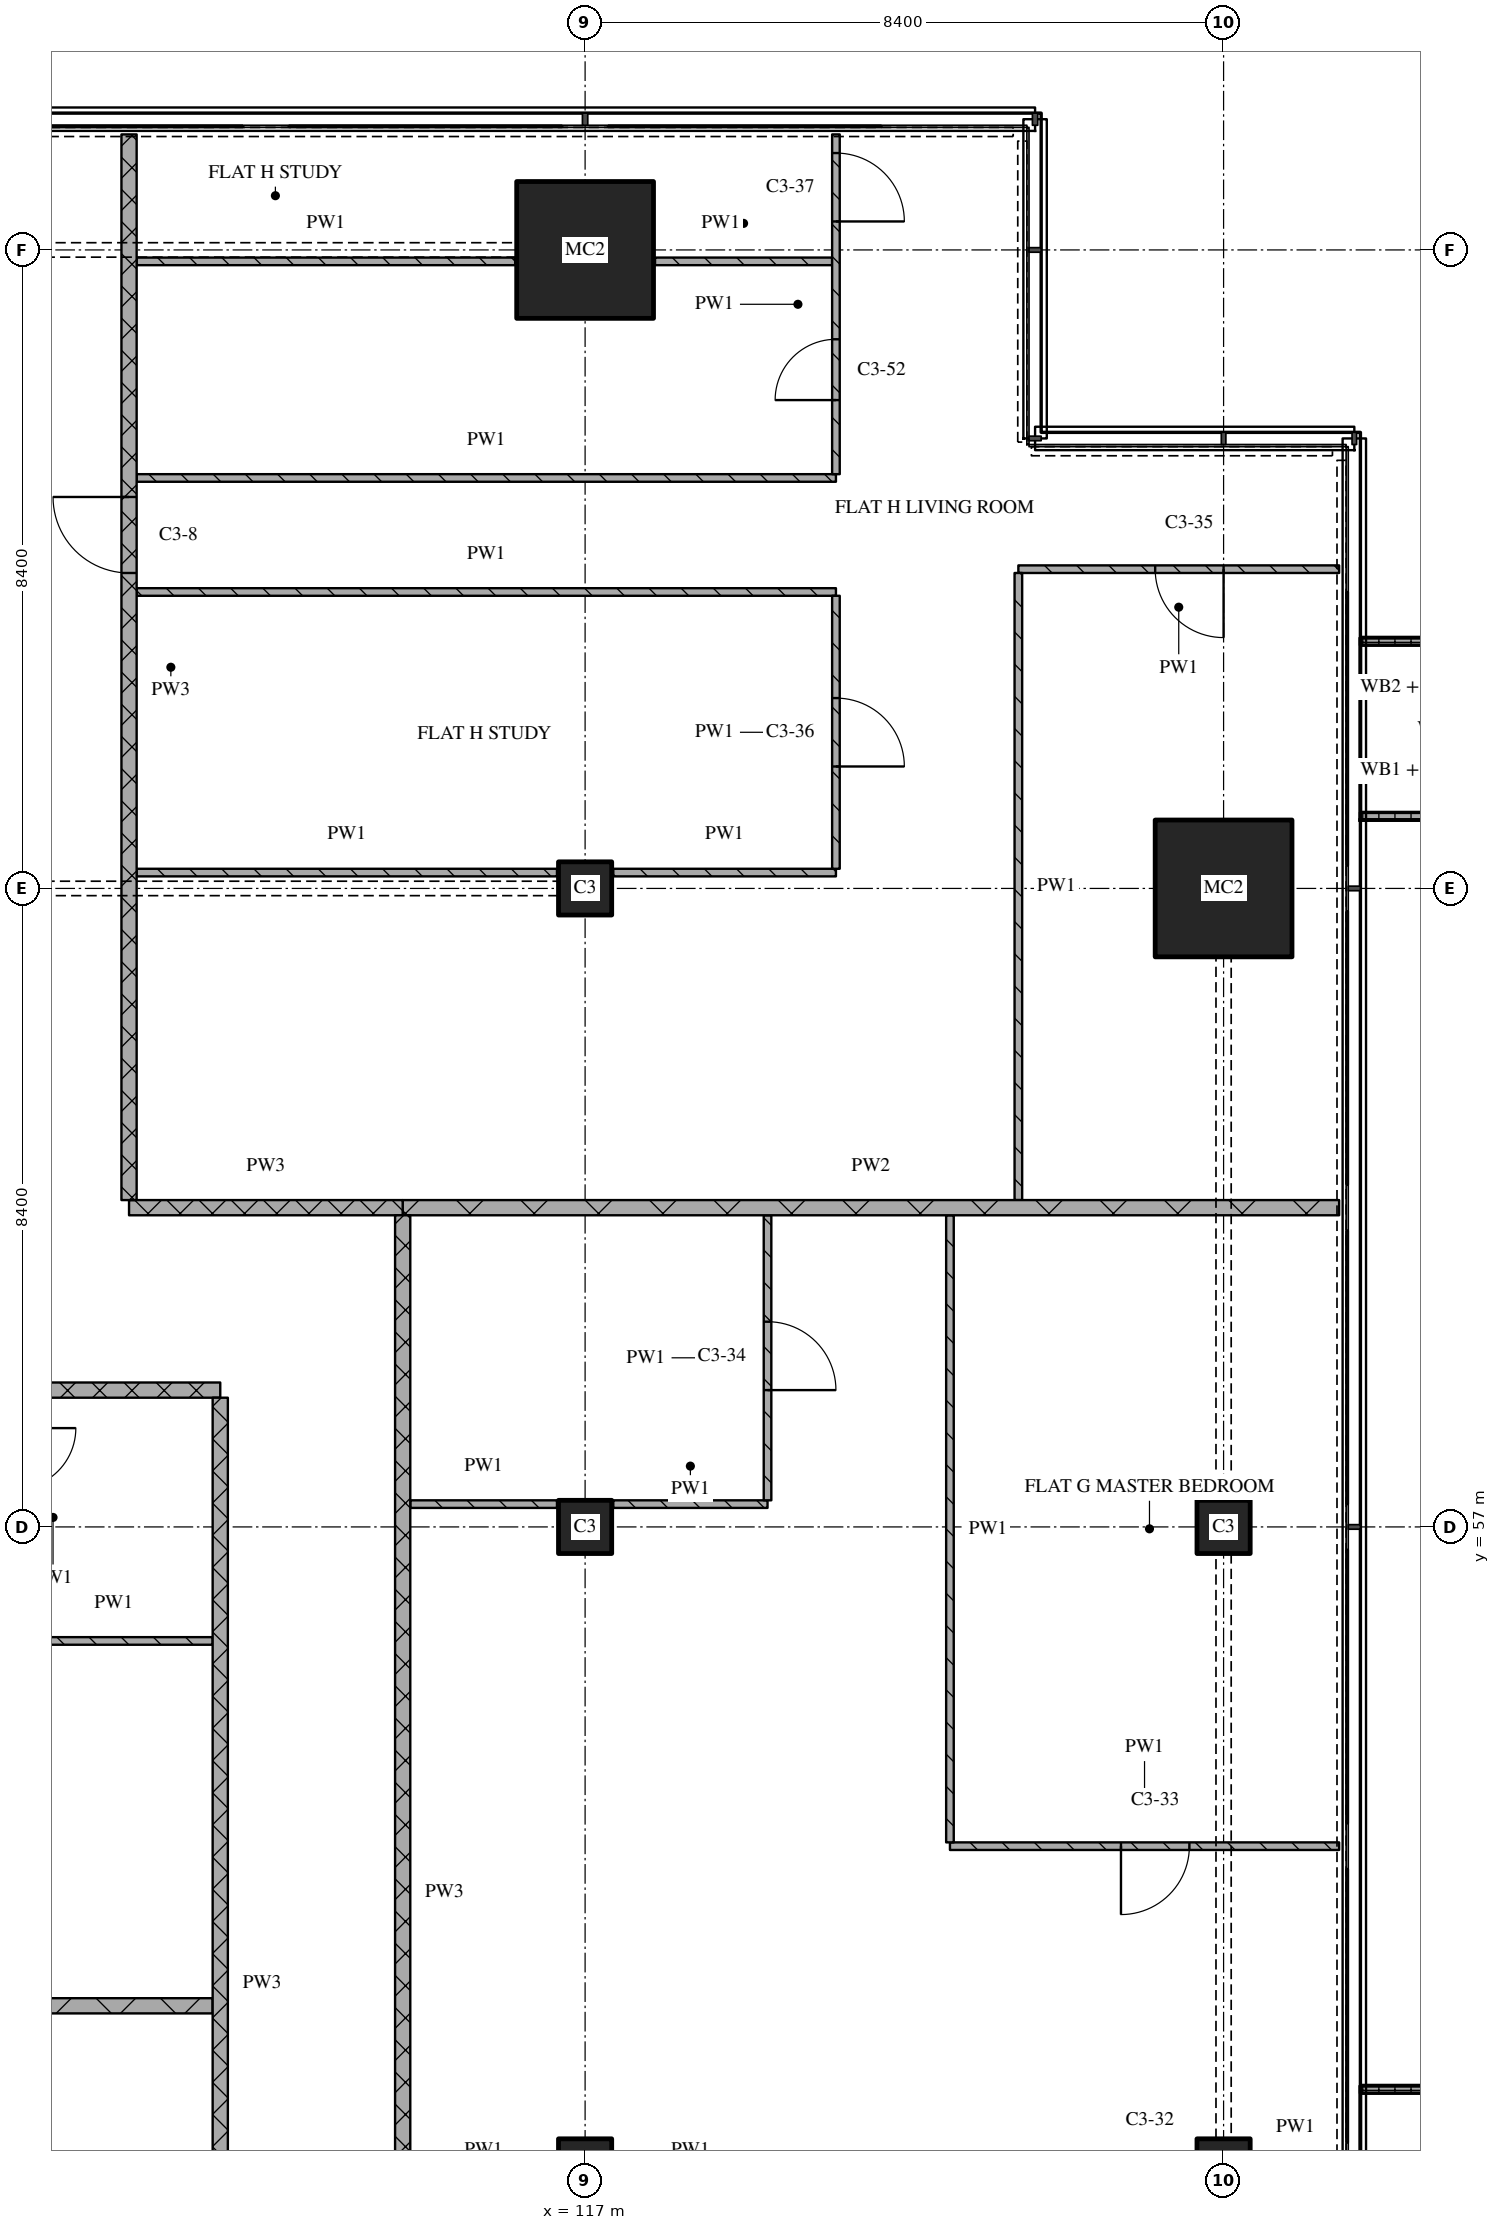
"""IFC4 building model, lengths in metres.
Left out: names, types, materials, properties, quantities, classifications, styles, units other than length and angle.
Written with IfcOpenShell. Run it as: python <this file> out.ifc"""

import sys

from ifc_helpers import new_model, si_unit, direction, frame, frame_2d, origin, origin_2d, place, context, subcontext, project, spatial, polyline, rectangle, outline, extrude, element, fill, save


model = new_model("IFC4")
c1 = context("Model", 3, precision=1e-05, world=origin(), true_north=direction((0.0, 1.0)))
c2 = subcontext(c1, "Body", "Model", "MODEL_VIEW")
j1 = project(units=[si_unit("LENGTHUNIT", "METRE"), si_unit("PLANEANGLEUNIT", "RADIAN")], contexts=[c1])
p1 = place(None, origin())
s1 = spatial("IfcSite", under=j1, at=p1, CompositionType="ELEMENT")
p2 = place(p1, origin())
s2 = spatial("IfcBuilding", under=s1, at=p2, CompositionType="ELEMENT")
p3 = place(p2, frame((0.0, 0.0, 172.65)))
s3 = spatial("IfcBuildingStorey", under=s2, at=p3, CompositionType="ELEMENT", Elevation=172.65)
for number, where, z_axis, x_axis in (
    (1, (117.0, 48.6, 0.0), (0.0, 0.0, 1.0), (1.0, 0.0, 0.0)),
    (2, (117.0, 57.0, 0.0), (0.0, 0.0, 1.0), (1.0, 0.0, 0.0)),
    (3, (117.0, 65.4, 0.0), (0.0, 0.0, 1.0), (1.0, 0.0, 0.0)),
):
    element("IfcColumn", number, at=place(p3, frame(where, z_axis=z_axis, x_axis=x_axis)), inside=s3, PredefinedType="COLUMN", context=c2, shape_type="SweptSolid", body=[
        extrude(rectangle(XDim=0.7, YDim=0.7, at=origin_2d()), origin(), (0.0, 0.0, 1.0), 3.6),
    ])
p4 = place(p3, frame((117.0, 73.8, 0.0), z_axis=(0.0, 0.0, 1.0), x_axis=(1.0, 0.0, 0.0)))
e4 = element("IfcColumn", 4, at=p4, inside=s3, PredefinedType="COLUMN", context=c2, shape_type="SweptSolid", body=[
    extrude(rectangle(XDim=1.8, YDim=1.8, at=origin_2d()), origin(), (0.0, 0.0, 1.0), 3.6),
])
for number, where, z_axis, x_axis in (
    (5, (125.4, 48.6, 0.0), (0.0, 0.0, 1.0), (1.0, 0.0, 0.0)),
    (6, (125.4, 57.0, 0.0), (0.0, 0.0, 1.0), (1.0, 0.0, 0.0)),
):
    element("IfcColumn", number, at=place(p3, frame(where, z_axis=z_axis, x_axis=x_axis)), inside=s3, PredefinedType="COLUMN", context=c2, shape_type="SweptSolid", body=[
        extrude(rectangle(XDim=0.7, YDim=0.7, at=origin_2d()), origin(), (0.0, 0.0, 1.0), 3.6),
    ])
p5 = place(p3, frame((125.4, 65.4, 0.0), z_axis=(0.0, 0.0, 1.0), x_axis=(1.0, 0.0, 0.0)))
e7 = element("IfcColumn", 7, at=p5, inside=s3, PredefinedType="COLUMN", context=c2, shape_type="SweptSolid", body=[
    extrude(rectangle(XDim=1.8, YDim=1.8, at=origin_2d()), origin(), (0.0, 0.0, 1.0), 3.6),
])
p6 = place(p3, origin())
e8 = element("IfcWall", 8, at=p6, inside=s3, PredefinedType="SOLIDWALL", context=c2, shape_type="SweptSolid", body=[
    extrude(outline(polyline([(127.2, 43.35), (127.2, 43.45), (128.967, 43.45), (128.967, 49.55), (127.2, 49.55), (127.2, 49.65), (129.067, 49.65), (129.067, 43.35), (127.2, 43.35)])), origin(), (0.0, 0.0, 1.0), 1.0),
])
p7 = place(p3, origin())
e9 = element("IfcWall", 9, at=p7, inside=s3, PredefinedType="SOLIDWALL", context=c2, shape_type="SweptSolid", body=[
    extrude(outline(polyline([(127.2, 66.3), (127.2, 66.4), (128.7, 66.4), (128.7, 68.6), (127.2, 68.6), (127.2, 68.7), (128.8, 68.7), (128.8, 66.3), (127.2, 66.3)])), origin(), (0.0, 0.0, 1.0), 1.0),
])
p8 = place(p3, frame((107.0, 50.7, 0.0), z_axis=(0.0, 0.0, 1.0), x_axis=(1.0, 0.0, 0.0)))
e10 = element("IfcWall", 10, at=p8, inside=s3, PredefinedType="PARTITIONING", context=c2, shape_type="SweptSolid", body=[
    extrude(rectangle(XDim=5.1, YDim=0.2, at=frame_2d((2.55, 0.0))), origin(), (0.0, 0.0, 1.0), 3.32),
])
p9 = place(p3, frame((121.8, 52.8, 0.0), z_axis=(0.0, 0.0, 1.0), x_axis=(1.0, 0.0, 0.0)))
e11 = element("IfcWall", 11, at=p9, inside=s3, PredefinedType="PARTITIONING", context=c2, shape_type="SweptSolid", body=[
    extrude(rectangle(XDim=5.12, YDim=0.1, at=frame_2d((2.56, 0.0))), origin(), (0.0, 0.0, 1.0), 3.32),
])
p10 = place(p9, frame((2.25, 0.0, 0.0)))
e12 = element("IfcOpeningElement", 12, at=p10, cuts=e11, PredefinedType="OPENING", context=c2, shape_type="SweptSolid", body=[
    extrude(rectangle(XDim=0.9, YDim=2.1, at=frame_2d((0.45, 1.05))), frame((0.0, 0.06, 0.0), z_axis=(0.0, -1.0, 0.0), x_axis=(1.0, 0.0, 0.0)), (0.0, 0.0, 1.0), 0.12),
])
p11 = place(p3, frame((109.5, 55.5, 0.0), z_axis=(0.0, 0.0, 1.0), x_axis=(1.0, 0.0, 0.0)))
e13 = element("IfcWall", 13, at=p11, inside=s3, PredefinedType="PARTITIONING", context=c2, shape_type="SweptSolid", body=[
    extrude(rectangle(XDim=2.6, YDim=0.1, at=frame_2d((1.3, 0.0))), origin(), (0.0, 0.0, 1.0), 3.32),
])
p12 = place(p3, frame((114.7, 57.3, 0.0), z_axis=(0.0, 0.0, 1.0), x_axis=(1.0, 0.0, 0.0)))
e14 = element("IfcWall", 14, at=p12, inside=s3, PredefinedType="PARTITIONING", context=c2, shape_type="SweptSolid", body=[
    extrude(rectangle(XDim=1.93, YDim=0.1, at=frame_2d((0.965, 0.0))), origin(), (0.0, 0.0, 1.0), 3.32),
])
p13 = place(p3, frame((117.37, 57.3, 0.0), z_axis=(0.0, 0.0, 1.0), x_axis=(1.0, 0.0, 0.0)))
e15 = element("IfcWall", 15, at=p13, inside=s3, PredefinedType="PARTITIONING", context=c2, shape_type="SweptSolid", body=[
    extrude(rectangle(XDim=2.03, YDim=0.1, at=frame_2d((1.015, 0.0))), origin(), (0.0, 0.0, 1.0), 3.32),
])
p14 = place(p3, frame((112.2, 58.8, 0.0), z_axis=(0.0, 0.0, 1.0), x_axis=(-1.0, 0.0, 0.0)))
e16 = element("IfcWall", 16, at=p14, inside=s3, PredefinedType="PARTITIONING", context=c2, shape_type="SweptSolid", body=[
    extrude(rectangle(XDim=10.8, YDim=0.2, at=frame_2d((5.4, 0.0))), origin(), (0.0, 0.0, 1.0), 3.32),
])
p15 = place(p14, frame((2.85, 0.0, 0.0)))
e17 = element("IfcOpeningElement", 17, at=p15, cuts=e16, PredefinedType="OPENING", context=c2, shape_type="SweptSolid", body=[
    extrude(rectangle(XDim=1.0, YDim=2.1, at=frame_2d((0.5, 1.05))), frame((0.0, 0.11, 0.0), z_axis=(0.0, -1.0, 0.0), x_axis=(1.0, 0.0, 0.0)), (0.0, 0.0, 1.0), 0.22),
])
p16 = place(p3, frame((111.0, 61.2, 0.0), z_axis=(0.0, 0.0, 1.0), x_axis=(1.0, 0.0, 0.0)))
e18 = element("IfcWall", 18, at=p16, inside=s3, PredefinedType="PARTITIONING", context=c2, shape_type="SweptSolid", body=[
    extrude(rectangle(XDim=3.6, YDim=0.2, at=frame_2d((1.8, 0.0))), origin(), (0.0, 0.0, 1.0), 3.32),
])
p17 = place(p3, frame((114.6, 61.2, 0.0), z_axis=(0.0, 0.0, 1.0), x_axis=(1.0, 0.0, 0.0)))
e19 = element("IfcWall", 19, at=p17, inside=s3, PredefinedType="PARTITIONING", context=c2, shape_type="SweptSolid", body=[
    extrude(rectangle(XDim=12.32, YDim=0.2, at=frame_2d((6.16, 0.0))), origin(), (0.0, 0.0, 1.0), 3.32),
])
p18 = place(p3, frame((111.1, 65.609, 0.0), z_axis=(0.0, 0.0, 1.0), x_axis=(1.0, 0.0, 0.0)))
e20 = element("IfcWall", 20, at=p18, inside=s3, PredefinedType="PARTITIONING", context=c2, shape_type="SweptSolid", body=[
    extrude(rectangle(XDim=5.53, YDim=0.1, at=frame_2d((2.765, 0.0))), origin(), (0.0, 0.0, 1.0), 3.32),
])
p19 = place(p3, frame((117.37, 65.609, 0.0), z_axis=(0.0, 0.0, 1.0), x_axis=(1.0, 0.0, 0.0)))
e21 = element("IfcWall", 21, at=p19, inside=s3, PredefinedType="PARTITIONING", context=c2, shape_type="SweptSolid", body=[
    extrude(rectangle(XDim=2.93, YDim=0.1, at=frame_2d((1.465, 0.0))), origin(), (0.0, 0.0, 1.0), 3.32),
])
p20 = place(p3, frame((111.1, 69.3, 0.0), z_axis=(0.0, 0.0, 1.0), x_axis=(1.0, 0.0, 0.0)))
e22 = element("IfcWall", 22, at=p20, inside=s3, PredefinedType="PARTITIONING", context=c2, shape_type="SweptSolid", body=[
    extrude(rectangle(XDim=9.2, YDim=0.1, at=frame_2d((4.6, 0.0))), origin(), (0.0, 0.0, 1.0), 3.32),
])
p21 = place(p3, frame((126.92, 69.6, 0.0), z_axis=(0.0, 0.0, 1.0), x_axis=(-1.0, 0.0, 0.0)))
e23 = element("IfcWall", 23, at=p21, inside=s3, PredefinedType="PARTITIONING", context=c2, shape_type="SweptSolid", body=[
    extrude(rectangle(XDim=4.22, YDim=0.1, at=frame_2d((2.11, 0.0))), origin(), (0.0, 0.0, 1.0), 3.32),
])
p22 = place(p21, frame((1.52, 0.0, 0.0)))
e24 = element("IfcOpeningElement", 24, at=p22, cuts=e23, PredefinedType="OPENING", context=c2, shape_type="SweptSolid", body=[
    extrude(rectangle(XDim=0.9, YDim=2.1, at=frame_2d((0.45, 1.05))), frame((0.0, 0.06, 0.0), z_axis=(0.0, -1.0, 0.0), x_axis=(1.0, 0.0, 0.0)), (0.0, 0.0, 1.0), 0.12),
])
p23 = place(p3, frame((111.1, 70.8, 0.0), z_axis=(0.0, 0.0, 1.0), x_axis=(1.0, 0.0, 0.0)))
e25 = element("IfcWall", 25, at=p23, inside=s3, PredefinedType="PARTITIONING", context=c2, shape_type="SweptSolid", body=[
    extrude(rectangle(XDim=9.2, YDim=0.1, at=frame_2d((4.6, 0.0))), origin(), (0.0, 0.0, 1.0), 3.32),
])
p24 = place(p3, frame((111.1, 73.649, 0.0), z_axis=(0.0, 0.0, 1.0), x_axis=(1.0, 0.0, 0.0)))
e26 = element("IfcWall", 26, at=p24, inside=s3, PredefinedType="PARTITIONING", context=c2, shape_type="SweptSolid", body=[
    extrude(rectangle(XDim=4.98, YDim=0.1, at=frame_2d((2.49, 0.0))), origin(), (0.0, 0.0, 1.0), 3.32),
])
p25 = place(p3, frame((117.92, 73.649, 0.0), z_axis=(0.0, 0.0, 1.0), x_axis=(1.0, 0.0, 0.0)))
e27 = element("IfcWall", 27, at=p25, inside=s3, PredefinedType="PARTITIONING", context=c2, shape_type="SweptSolid", body=[
    extrude(rectangle(XDim=2.33, YDim=0.1, at=frame_2d((1.165, 0.0))), origin(), (0.0, 0.0, 1.0), 3.32),
])
p26 = place(p3, frame((111.0, 75.32, 0.0), z_axis=(0.0, 0.0, 1.0), x_axis=(0.0, -1.0, 0.0)))
e28 = element("IfcWall", 28, at=p26, inside=s3, PredefinedType="PARTITIONING", context=c2, shape_type="SweptSolid", body=[
    extrude(rectangle(XDim=14.02, YDim=0.2, at=frame_2d((7.01, 0.0))), origin(), (0.0, 0.0, 1.0), 3.32),
])
p27 = place(p26, frame((4.77, 0.0, 0.0)))
e29 = element("IfcOpeningElement", 29, at=p27, cuts=e28, PredefinedType="OPENING", context=c2, shape_type="SweptSolid", body=[
    extrude(rectangle(XDim=1.0, YDim=2.1, at=frame_2d((0.5, 1.05))), frame((0.0, 0.11, 0.0), z_axis=(0.0, -1.0, 0.0), x_axis=(1.0, 0.0, 0.0)), (0.0, 0.0, 1.0), 0.22),
])
p28 = place(p3, frame((112.2, 58.7, 0.0), z_axis=(0.0, 0.0, 1.0), x_axis=(0.0, -1.0, 0.0)))
e30 = element("IfcWall", 30, at=p28, inside=s3, PredefinedType="PARTITIONING", context=c2, shape_type="SweptSolid", body=[
    extrude(rectangle(XDim=15.4, YDim=0.2, at=frame_2d((7.7, 0.0))), origin(), (0.0, 0.0, 1.0), 3.32),
])
p29 = place(p3, frame((114.6, 61.1, 0.0), z_axis=(0.0, 0.0, 1.0), x_axis=(0.0, -1.0, 0.0)))
e31 = element("IfcWall", 31, at=p29, inside=s3, PredefinedType="PARTITIONING", context=c2, shape_type="SweptSolid", body=[
    extrude(rectangle(XDim=17.8, YDim=0.2, at=frame_2d((8.9, 0.0))), origin(), (0.0, 0.0, 1.0), 3.32),
])
p30 = place(p3, frame((119.4, 57.35, 0.0), z_axis=(0.0, 0.0, 1.0), x_axis=(0.0, 1.0, 0.0)))
e32 = element("IfcWall", 32, at=p30, inside=s3, PredefinedType="PARTITIONING", context=c2, shape_type="SweptSolid", body=[
    extrude(rectangle(XDim=3.75, YDim=0.1, at=frame_2d((1.875, 0.0))), origin(), (0.0, 0.0, 1.0), 3.32),
])
p31 = place(p30, frame((1.45, 0.0, 0.0)))
e33 = element("IfcOpeningElement", 33, at=p31, cuts=e32, PredefinedType="OPENING", context=c2, shape_type="SweptSolid", body=[
    extrude(rectangle(XDim=0.9, YDim=2.1, at=frame_2d((0.45, 1.05))), frame((0.0, 0.06, 0.0), z_axis=(0.0, -1.0, 0.0), x_axis=(1.0, 0.0, 0.0)), (0.0, 0.0, 1.0), 0.12),
])
p32 = place(p3, frame((120.3, 65.659, 0.0), z_axis=(0.0, 0.0, 1.0), x_axis=(0.0, 1.0, 0.0)))
e34 = element("IfcWall", 34, at=p32, inside=s3, PredefinedType="PARTITIONING", context=c2, shape_type="SweptSolid", body=[
    extrude(rectangle(XDim=3.591, YDim=0.1, at=frame_2d((1.796, 0.0))), origin(), (0.0, 0.0, 1.0), 3.32),
])
p33 = place(p32, frame((1.346, 0.0, 0.0)))
e35 = element("IfcOpeningElement", 35, at=p33, cuts=e34, PredefinedType="OPENING", context=c2, shape_type="SweptSolid", body=[
    extrude(rectangle(XDim=0.9, YDim=2.1, at=frame_2d((0.45, 1.05))), frame((0.0, 0.06, 0.0), z_axis=(0.0, -1.0, 0.0), x_axis=(1.0, 0.0, 0.0)), (0.0, 0.0, 1.0), 0.12),
])
p34 = place(p3, frame((120.3, 70.85, 0.0), z_axis=(0.0, 0.0, 1.0), x_axis=(0.0, 1.0, 0.0)))
e36 = element("IfcWall", 36, at=p34, inside=s3, PredefinedType="PARTITIONING", context=c2, shape_type="SweptSolid", body=[
    extrude(rectangle(XDim=4.47, YDim=0.1, at=frame_2d((2.235, 0.0))), origin(), (0.0, 0.0, 1.0), 3.32),
])
p35 = place(p34, frame((0.975, 0.0, 0.0)))
e37 = element("IfcOpeningElement", 37, at=p35, cuts=e36, PredefinedType="OPENING", context=c2, shape_type="SweptSolid", body=[
    extrude(rectangle(XDim=0.8, YDim=2.1, at=frame_2d((0.4, 1.05))), frame((0.0, 0.06, 0.0), z_axis=(0.0, -1.0, 0.0), x_axis=(1.0, 0.0, 0.0)), (0.0, 0.0, 1.0), 0.12),
])
p36 = place(p34, frame((3.325, 0.0, 0.0)))
e38 = element("IfcOpeningElement", 38, at=p36, cuts=e36, PredefinedType="OPENING", context=c2, shape_type="SweptSolid", body=[
    extrude(rectangle(XDim=0.9, YDim=2.1, at=frame_2d((0.45, 1.05))), frame((0.0, 0.06, 0.0), z_axis=(0.0, -1.0, 0.0), x_axis=(1.0, 0.0, 0.0)), (0.0, 0.0, 1.0), 0.12),
])
for number, where, z_axis, x_axis in (
    (39, (121.8, 61.1, 0.0), (0.0, 0.0, 1.0), (0.0, -1.0, 0.0)),
    (40, (122.7, 69.55, 0.0), (0.0, 0.0, 1.0), (0.0, -1.0, 0.0)),
):
    element("IfcWall", number, at=place(p3, frame(where, z_axis=z_axis, x_axis=x_axis)), inside=s3, PredefinedType="PARTITIONING", context=c2, shape_type="SweptSolid", body=[
        extrude(rectangle(XDim=8.25, YDim=0.1, at=frame_2d((4.125, 0.0))), origin(), (0.0, 0.0, 1.0), 3.32),
    ])
p37 = place(p10, origin())
e41 = element("IfcDoor", 41, at=p37, inside=s3, OperationType="SINGLE_SWING_RIGHT", PredefinedType="DOOR", context=c2, shape_type="SweptSolid", body=[
    extrude(rectangle(XDim=0.9, YDim=2.1, at=frame_2d((0.45, 1.05))), frame((0.0, 0.025, 0.0), z_axis=(0.0, -1.0, 0.0), x_axis=(1.0, 0.0, 0.0)), (0.0, 0.0, 1.0), 0.05),
])
fill(e12, e41)
p38 = place(p22, origin())
e42 = element("IfcDoor", 42, at=p38, inside=s3, OperationType="SINGLE_SWING_LEFT", PredefinedType="DOOR", context=c2, shape_type="SweptSolid", body=[
    extrude(rectangle(XDim=0.9, YDim=2.1, at=frame_2d((0.45, 1.05))), frame((0.0, 0.025, 0.0), z_axis=(0.0, -1.0, 0.0), x_axis=(1.0, 0.0, 0.0)), (0.0, 0.0, 1.0), 0.05),
])
fill(e24, e42)
p39 = place(p27, origin())
e43 = element("IfcDoor", 43, at=p39, inside=s3, OperationType="SINGLE_SWING_RIGHT", PredefinedType="DOOR", context=c2, shape_type="SweptSolid", body=[
    extrude(rectangle(XDim=1.0, YDim=2.1, at=frame_2d((0.5, 1.05))), frame((0.0, 0.025, 0.0), z_axis=(0.0, -1.0, 0.0), x_axis=(1.0, 0.0, 0.0)), (0.0, 0.0, 1.0), 0.05),
])
fill(e29, e43)
p40 = place(p31, origin())
e44 = element("IfcDoor", 44, at=p40, inside=s3, OperationType="SINGLE_SWING_RIGHT", PredefinedType="DOOR", context=c2, shape_type="SweptSolid", body=[
    extrude(rectangle(XDim=0.9, YDim=2.1, at=frame_2d((0.45, 1.05))), frame((0.0, 0.025, 0.0), z_axis=(0.0, -1.0, 0.0), x_axis=(1.0, 0.0, 0.0)), (0.0, 0.0, 1.0), 0.05),
])
fill(e33, e44)
p41 = place(p33, origin())
e45 = element("IfcDoor", 45, at=p41, inside=s3, OperationType="SINGLE_SWING_RIGHT", PredefinedType="DOOR", context=c2, shape_type="SweptSolid", body=[
    extrude(rectangle(XDim=0.9, YDim=2.1, at=frame_2d((0.45, 1.05))), frame((0.0, 0.025, 0.0), z_axis=(0.0, -1.0, 0.0), x_axis=(1.0, 0.0, 0.0)), (0.0, 0.0, 1.0), 0.05),
])
fill(e35, e45)
p42 = place(p35, origin())
e46 = element("IfcDoor", 46, at=p42, inside=s3, OperationType="SINGLE_SWING_LEFT", PredefinedType="DOOR", context=c2, shape_type="SweptSolid", body=[
    extrude(rectangle(XDim=0.8, YDim=2.1, at=frame_2d((0.4, 1.05))), frame((0.0, 0.025, 0.0), z_axis=(0.0, -1.0, 0.0), x_axis=(1.0, 0.0, 0.0)), (0.0, 0.0, 1.0), 0.05),
])
fill(e37, e46)
p43 = place(p36, origin())
e47 = element("IfcDoor", 47, at=p43, inside=s3, OperationType="SINGLE_SWING_RIGHT", PredefinedType="DOOR", context=c2, shape_type="SweptSolid", body=[
    extrude(rectangle(XDim=0.9, YDim=2.1, at=frame_2d((0.45, 1.05))), frame((0.0, 0.025, 0.0), z_axis=(0.0, -1.0, 0.0), x_axis=(1.0, 0.0, 0.0)), (0.0, 0.0, 1.0), 0.05),
])
fill(e38, e47)
save(model, sys.argv[1])
